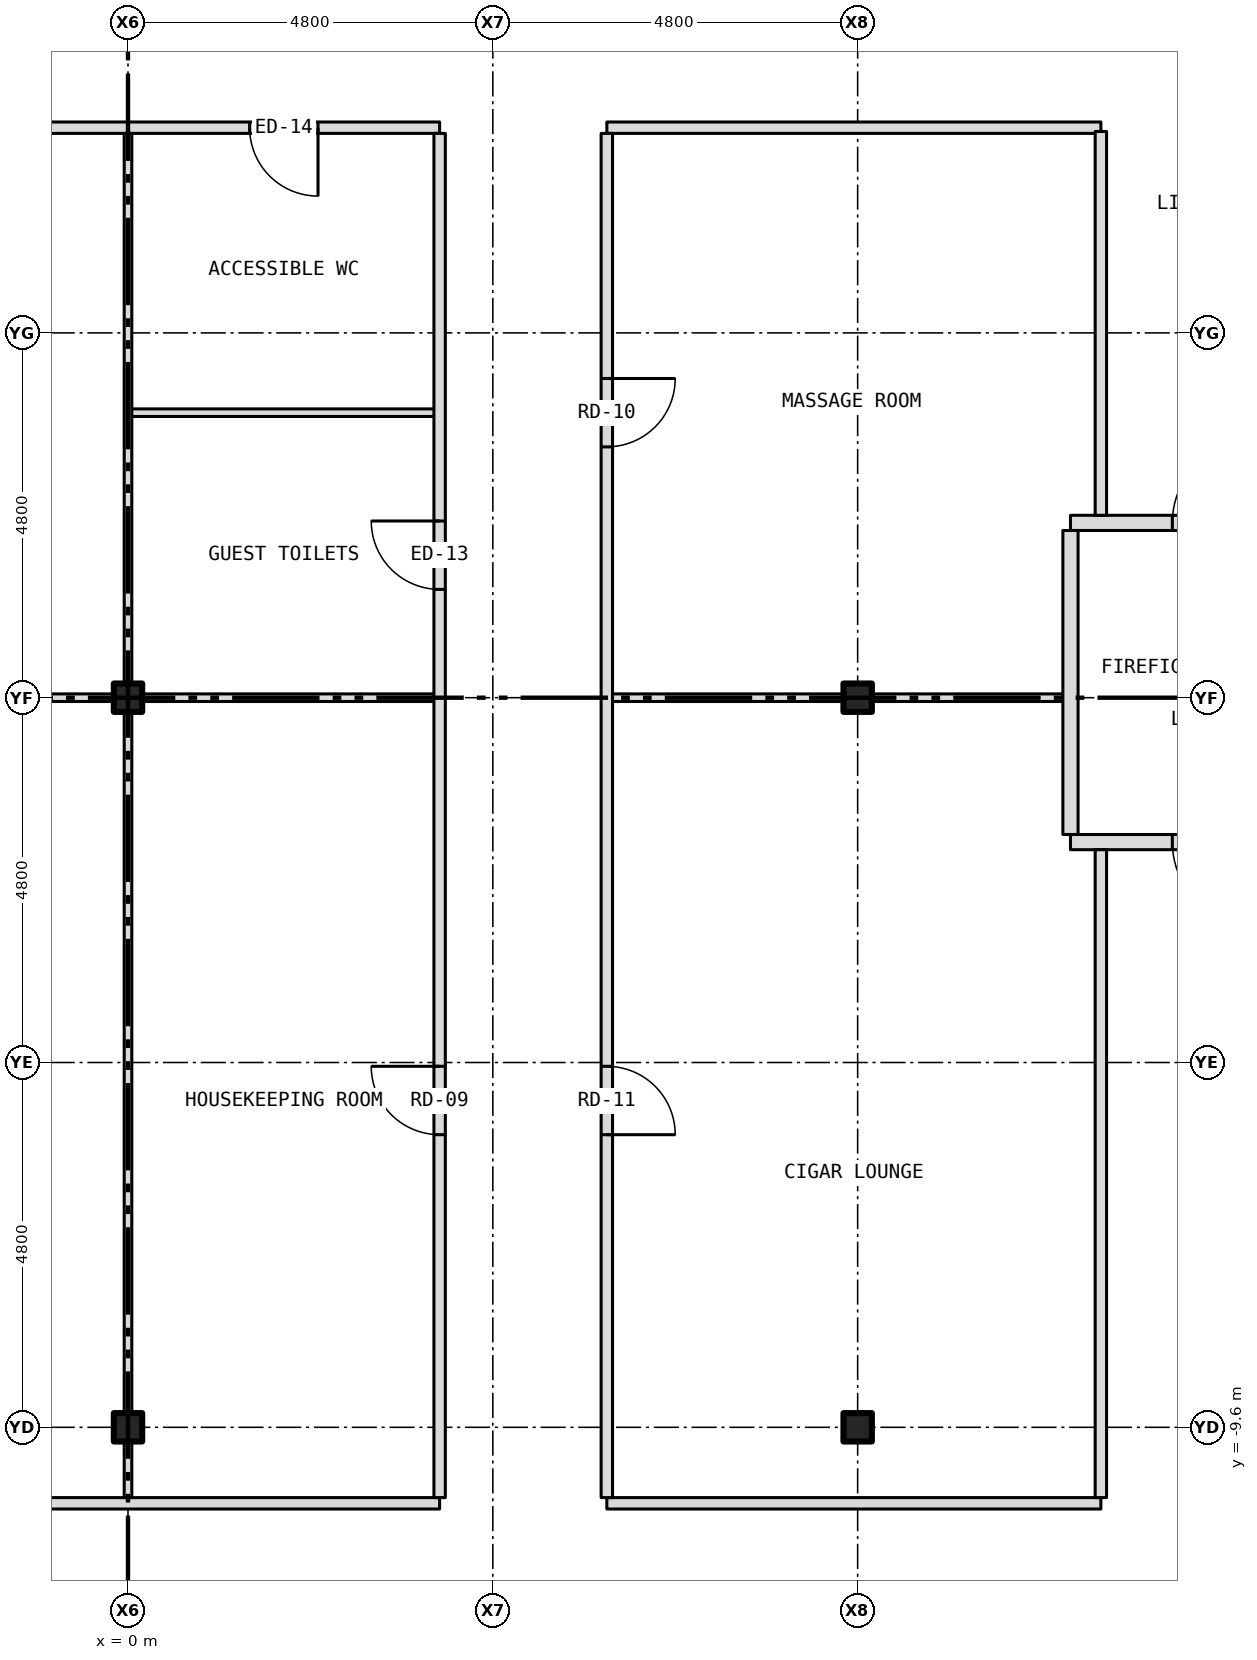
"""IFC4 building model, lengths in metres.
Left out: names, types, materials, properties, quantities, classifications, styles, units other than length and angle.
Written with IfcOpenShell. Run it as: python <this file> out.ifc"""

import sys

from ifc_helpers import new_model, si_unit, direction, frame, frame_2d, origin, origin_2d, place, context, subcontext, project, spatial, rectangle, i_section, extrude, element, fill, save


model = new_model("IFC4")
c1 = context("Model", 3, precision=1e-05, world=origin(), true_north=direction((0.0, 1.0)))
c2 = subcontext(c1, "Body", "Model", "MODEL_VIEW")
j1 = project(units=[si_unit("LENGTHUNIT", "METRE"), si_unit("PLANEANGLEUNIT", "RADIAN")], contexts=[c1])
p1 = place(None, origin())
s1 = spatial("IfcSite", under=j1, at=p1, CompositionType="ELEMENT")
p2 = place(p1, origin())
s2 = spatial("IfcBuilding", under=s1, at=p2, CompositionType="ELEMENT")
p3 = place(p2, frame((0.0, 0.0, 201.5)))
s3 = spatial("IfcBuildingStorey", under=s2, at=p3, CompositionType="ELEMENT", Elevation=201.5)
for number, where, z_axis, x_axis in (
    (1, (0.0, -9.6, -0.15), (0.0, 0.0, 1.0), (1.0, 0.0, 0.0)),
    (2, (0.0, 0.0, -0.15), (0.0, 0.0, 1.0), (1.0, 0.0, 0.0)),
    (3, (9.6, -9.6, -0.15), (0.0, 0.0, 1.0), (1.0, 0.0, 0.0)),
    (4, (9.6, 0.0, -0.15), (0.0, 0.0, 1.0), (1.0, 0.0, 0.0)),
):
    element("IfcColumn", number, at=place(p3, frame(where, z_axis=z_axis, x_axis=x_axis)), inside=s3, PredefinedType="COLUMN", context=c2, shape_type="SweptSolid", body=[
        extrude(i_section(OverallWidth=0.373, OverallDepth=0.373, WebThickness=0.016, FlangeThickness=0.026, at=origin_2d()), origin(), (0.0, 0.0, 1.0), 3.5),
    ])
p4 = place(p3, frame((-12.8, -10.6, 0.0), z_axis=(0.0, 0.0, 1.0), x_axis=(1.0, 0.0, 0.0)))
e5 = element("IfcWall", 5, at=p4, inside=s3, PredefinedType="PARTITIONING", context=c2, shape_type="SweptSolid", body=[
    extrude(rectangle(XDim=16.9, YDim=0.15, at=frame_2d((8.45, 0.0))), origin(), (0.0, 0.0, 1.0), 3.35),
])
p5 = place(p4, frame((5.95, 0.0, 0.0)))
e6 = element("IfcOpeningElement", 6, at=p5, cuts=e5, PredefinedType="OPENING", context=c2, shape_type="SweptSolid", body=[
    extrude(rectangle(XDim=0.9, YDim=2.1, at=frame_2d((0.45, 1.05))), frame((0.0, 0.087, 0.0), z_axis=(0.0, -1.0, 0.0), x_axis=(1.0, 0.0, 0.0)), (0.0, 0.0, 1.0), 0.174),
])
p6 = place(p3, frame((6.3, -10.6, 0.0), z_axis=(0.0, 0.0, 1.0), x_axis=(1.0, 0.0, 0.0)))
e7 = element("IfcWall", 7, at=p6, inside=s3, PredefinedType="PARTITIONING", context=c2, shape_type="SweptSolid", body=[
    extrude(rectangle(XDim=6.5, YDim=0.15, at=frame_2d((3.25, 0.0))), origin(), (0.0, 0.0, 1.0), 3.35),
])
p7 = place(p3, frame((12.4, -1.9, 0.0), z_axis=(0.0, 0.0, 1.0), x_axis=(1.0, 0.0, 0.0)))
e8 = element("IfcWall", 8, at=p7, inside=s3, PredefinedType="PARTITIONING", context=c2, shape_type="SweptSolid", body=[
    extrude(rectangle(XDim=3.28, YDim=0.2, at=frame_2d((1.64, 0.0))), origin(), (0.0, 0.0, 1.0), 3.35),
])
p8 = place(p7, frame((1.34, 0.0, 0.0)))
e9 = element("IfcOpeningElement", 9, at=p8, cuts=e8, PredefinedType="OPENING", context=c2, shape_type="SweptSolid", body=[
    extrude(rectangle(XDim=1.1, YDim=2.1, at=frame_2d((0.55, 1.05))), frame((0.0, 0.112, 0.0), z_axis=(0.0, -1.0, 0.0), x_axis=(1.0, 0.0, 0.0)), (0.0, 0.0, 1.0), 0.224),
])
p9 = place(p3, frame((-9.413, 0.0, 0.0), z_axis=(0.0, 0.0, 1.0), x_axis=(1.0, 0.0, 0.0)))
e10 = element("IfcWall", 10, at=p9, inside=s3, PredefinedType="PARTITIONING", context=c2, shape_type="SweptSolid", body=[
    extrude(rectangle(XDim=9.226, YDim=0.1, at=frame_2d((4.613, 0.0))), origin(), (0.0, 0.0, 1.0), 2.728),
])
p10 = place(p3, frame((-0.187, 0.0, 0.0), z_axis=(0.0, 0.0, 1.0), x_axis=(1.0, 0.0, 0.0)))
e11 = element("IfcWall", 11, at=p10, inside=s3, PredefinedType="PARTITIONING", context=c2, shape_type="SweptSolid", body=[
    extrude(rectangle(XDim=0.374, YDim=0.1, at=frame_2d((0.187, 0.0))), origin(), (0.0, 0.0, 1.0), 3.35),
])
p11 = place(p3, frame((0.187, 0.0, 0.0), z_axis=(0.0, 0.0, 1.0), x_axis=(1.0, 0.0, 0.0)))
e12 = element("IfcWall", 12, at=p11, inside=s3, PredefinedType="PARTITIONING", context=c2, shape_type="SweptSolid", body=[
    extrude(rectangle(XDim=3.913, YDim=0.1, at=frame_2d((1.957, 0.0))), origin(), (0.0, 0.0, 1.0), 2.728),
])
p12 = place(p3, frame((6.3, 0.0, 0.0), z_axis=(0.0, 0.0, 1.0), x_axis=(1.0, 0.0, 0.0)))
e13 = element("IfcWall", 13, at=p12, inside=s3, PredefinedType="PARTITIONING", context=c2, shape_type="SweptSolid", body=[
    extrude(rectangle(XDim=3.113, YDim=0.1, at=frame_2d((1.557, 0.0))), origin(), (0.0, 0.0, 1.0), 2.728),
])
p13 = place(p3, frame((9.413, 0.0, 0.0), z_axis=(0.0, 0.0, 1.0), x_axis=(1.0, 0.0, 0.0)))
e14 = element("IfcWall", 14, at=p13, inside=s3, PredefinedType="PARTITIONING", context=c2, shape_type="SweptSolid", body=[
    extrude(rectangle(XDim=0.374, YDim=0.1, at=frame_2d((0.187, 0.0))), origin(), (0.0, 0.0, 1.0), 3.35),
])
p14 = place(p3, frame((9.787, 0.0, 0.0), z_axis=(0.0, 0.0, 1.0), x_axis=(1.0, 0.0, 0.0)))
e15 = element("IfcWall", 15, at=p14, inside=s3, PredefinedType="PARTITIONING", context=c2, shape_type="SweptSolid", body=[
    extrude(rectangle(XDim=2.613, YDim=0.1, at=frame_2d((1.306, 0.0))), origin(), (0.0, 0.0, 1.0), 2.728),
])
p15 = place(p3, frame((12.4, 2.3, 0.0), z_axis=(0.0, 0.0, 1.0), x_axis=(1.0, 0.0, 0.0)))
e16 = element("IfcWall", 16, at=p15, inside=s3, PredefinedType="PARTITIONING", context=c2, shape_type="SweptSolid", body=[
    extrude(rectangle(XDim=3.28, YDim=0.2, at=frame_2d((1.64, 0.0))), origin(), (0.0, 0.0, 1.0), 3.35),
])
p16 = place(p15, frame((1.34, 0.0, 0.0)))
e17 = element("IfcOpeningElement", 17, at=p16, cuts=e16, PredefinedType="OPENING", context=c2, shape_type="SweptSolid", body=[
    extrude(rectangle(XDim=1.1, YDim=2.1, at=frame_2d((0.55, 1.05))), frame((0.0, 0.112, 0.0), z_axis=(0.0, -1.0, 0.0), x_axis=(1.0, 0.0, 0.0)), (0.0, 0.0, 1.0), 0.224),
])
p17 = place(p3, frame((0.0, 3.75, 0.0), z_axis=(0.0, 0.0, 1.0), x_axis=(1.0, 0.0, 0.0)))
e18 = element("IfcWall", 18, at=p17, inside=s3, PredefinedType="PARTITIONING", context=c2, shape_type="SweptSolid", body=[
    extrude(rectangle(XDim=4.1, YDim=0.1, at=frame_2d((2.05, 0.0))), origin(), (0.0, 0.0, 1.0), 3.35),
])
p18 = place(p3, frame((-12.8, 7.5, 0.0), z_axis=(0.0, 0.0, 1.0), x_axis=(1.0, 0.0, 0.0)))
e19 = element("IfcWall", 19, at=p18, inside=s3, PredefinedType="PARTITIONING", context=c2, shape_type="SweptSolid", body=[
    extrude(rectangle(XDim=16.9, YDim=0.15, at=frame_2d((8.45, 0.0))), origin(), (0.0, 0.0, 1.0), 3.35),
])
p19 = place(p18, frame((14.4, 0.0, 0.0)))
e20 = element("IfcOpeningElement", 20, at=p19, cuts=e19, PredefinedType="OPENING", context=c2, shape_type="SweptSolid", body=[
    extrude(rectangle(XDim=0.9, YDim=2.1, at=frame_2d((0.45, 1.05))), frame((0.0, 0.087, 0.0), z_axis=(0.0, -1.0, 0.0), x_axis=(1.0, 0.0, 0.0)), (0.0, 0.0, 1.0), 0.174),
])
p20 = place(p18, frame((5.95, 0.0, 0.0)))
e21 = element("IfcOpeningElement", 21, at=p20, cuts=e19, PredefinedType="OPENING", context=c2, shape_type="SweptSolid", body=[
    extrude(rectangle(XDim=0.9, YDim=2.1, at=frame_2d((0.45, 1.05))), frame((0.0, 0.087, 0.0), z_axis=(0.0, -1.0, 0.0), x_axis=(1.0, 0.0, 0.0)), (0.0, 0.0, 1.0), 0.174),
])
p21 = place(p3, frame((6.3, 7.5, 0.0), z_axis=(0.0, 0.0, 1.0), x_axis=(1.0, 0.0, 0.0)))
e22 = element("IfcWall", 22, at=p21, inside=s3, PredefinedType="PARTITIONING", context=c2, shape_type="SweptSolid", body=[
    extrude(rectangle(XDim=6.5, YDim=0.15, at=frame_2d((3.25, 0.0))), origin(), (0.0, 0.0, 1.0), 3.35),
])
p22 = place(p3, frame((0.0, -10.525, 0.0), z_axis=(0.0, 0.0, 1.0), x_axis=(0.0, 1.0, 0.0)))
e23 = element("IfcWall", 23, at=p22, inside=s3, PredefinedType="PARTITIONING", context=c2, shape_type="SweptSolid", body=[
    extrude(rectangle(XDim=0.738, YDim=0.1, at=frame_2d((0.369, 0.0))), origin(), (0.0, 0.0, 1.0), 2.728),
])
p23 = place(p3, frame((0.0, -9.787, 0.0), z_axis=(0.0, 0.0, 1.0), x_axis=(0.0, 1.0, 0.0)))
e24 = element("IfcWall", 24, at=p23, inside=s3, PredefinedType="PARTITIONING", context=c2, shape_type="SweptSolid", body=[
    extrude(rectangle(XDim=0.374, YDim=0.1, at=frame_2d((0.187, 0.0))), origin(), (0.0, 0.0, 1.0), 3.35),
])
p24 = place(p3, frame((0.0, -9.413, 0.0), z_axis=(0.0, 0.0, 1.0), x_axis=(0.0, 1.0, 0.0)))
e25 = element("IfcWall", 25, at=p24, inside=s3, PredefinedType="PARTITIONING", context=c2, shape_type="SweptSolid", body=[
    extrude(rectangle(XDim=9.363, YDim=0.1, at=frame_2d((4.682, 0.0))), origin(), (0.0, 0.0, 1.0), 2.728),
])
p25 = place(p3, frame((0.0, 0.05, 0.0), z_axis=(0.0, 0.0, 1.0), x_axis=(0.0, 1.0, 0.0)))
e26 = element("IfcWall", 26, at=p25, inside=s3, PredefinedType="PARTITIONING", context=c2, shape_type="SweptSolid", body=[
    extrude(rectangle(XDim=7.375, YDim=0.1, at=frame_2d((3.688, 0.0))), origin(), (0.0, 0.0, 1.0), 2.728),
])
p26 = place(p3, frame((4.1, -10.525, 0.0), z_axis=(0.0, 0.0, 1.0), x_axis=(0.0, 1.0, 0.0)))
e27 = element("IfcWall", 27, at=p26, inside=s3, PredefinedType="PARTITIONING", context=c2, shape_type="SweptSolid", body=[
    extrude(rectangle(XDim=17.95, YDim=0.15, at=frame_2d((8.975, 0.0))), origin(), (0.0, 0.0, 1.0), 3.35),
])
p27 = place(p26, frame((11.95, 0.0, 0.0)))
e28 = element("IfcOpeningElement", 28, at=p27, cuts=e27, PredefinedType="OPENING", context=c2, shape_type="SweptSolid", body=[
    extrude(rectangle(XDim=0.9, YDim=2.1, at=frame_2d((0.45, 1.05))), frame((0.0, 0.087, 0.0), z_axis=(0.0, -1.0, 0.0), x_axis=(1.0, 0.0, 0.0)), (0.0, 0.0, 1.0), 0.174),
])
p28 = place(p26, frame((4.775, 0.0, 0.0)))
e29 = element("IfcOpeningElement", 29, at=p28, cuts=e27, PredefinedType="OPENING", context=c2, shape_type="SweptSolid", body=[
    extrude(rectangle(XDim=0.9, YDim=2.1, at=frame_2d((0.45, 1.05))), frame((0.0, 0.087, 0.0), z_axis=(0.0, -1.0, 0.0), x_axis=(1.0, 0.0, 0.0)), (0.0, 0.0, 1.0), 0.174),
])
p29 = place(p3, frame((6.3, -10.525, 0.0), z_axis=(0.0, 0.0, 1.0), x_axis=(0.0, 1.0, 0.0)))
e30 = element("IfcWall", 30, at=p29, inside=s3, PredefinedType="PARTITIONING", context=c2, shape_type="SweptSolid", body=[
    extrude(rectangle(XDim=17.95, YDim=0.15, at=frame_2d((8.975, 0.0))), origin(), (0.0, 0.0, 1.0), 3.35),
])
p30 = place(p29, frame((13.825, 0.0, 0.0)))
e31 = element("IfcOpeningElement", 31, at=p30, cuts=e30, PredefinedType="OPENING", context=c2, shape_type="SweptSolid", body=[
    extrude(rectangle(XDim=0.9, YDim=2.1, at=frame_2d((0.45, 1.05))), frame((0.0, 0.087, 0.0), z_axis=(0.0, -1.0, 0.0), x_axis=(1.0, 0.0, 0.0)), (0.0, 0.0, 1.0), 0.174),
])
p31 = place(p29, frame((4.775, 0.0, 0.0)))
e32 = element("IfcOpeningElement", 32, at=p31, cuts=e30, PredefinedType="OPENING", context=c2, shape_type="SweptSolid", body=[
    extrude(rectangle(XDim=0.9, YDim=2.1, at=frame_2d((0.45, 1.05))), frame((0.0, 0.087, 0.0), z_axis=(0.0, -1.0, 0.0), x_axis=(1.0, 0.0, 0.0)), (0.0, 0.0, 1.0), 0.174),
])
p32 = place(p3, frame((12.4, -1.8, 0.0), z_axis=(0.0, 0.0, 1.0), x_axis=(0.0, 1.0, 0.0)))
e33 = element("IfcWall", 33, at=p32, inside=s3, PredefinedType="PARTITIONING", context=c2, shape_type="SweptSolid", body=[
    extrude(rectangle(XDim=4.0, YDim=0.2, at=frame_2d((2.0, 0.0))), origin(), (0.0, 0.0, 1.0), 3.35),
])
p33 = place(p3, frame((12.8, -10.525, 0.0), z_axis=(0.0, 0.0, 1.0), x_axis=(0.0, 1.0, 0.0)))
e34 = element("IfcWall", 34, at=p33, inside=s3, PredefinedType="PARTITIONING", context=c2, shape_type="SweptSolid", body=[
    extrude(rectangle(XDim=8.525, YDim=0.15, at=frame_2d((4.262, 0.0))), origin(), (0.0, 0.0, 1.0), 3.35),
])
p34 = place(p3, frame((12.8, 2.4, 0.0), z_axis=(0.0, 0.0, 1.0), x_axis=(0.0, 1.0, 0.0)))
e35 = element("IfcWall", 35, at=p34, inside=s3, PredefinedType="PARTITIONING", context=c2, shape_type="SweptSolid", body=[
    extrude(rectangle(XDim=5.05, YDim=0.15, at=frame_2d((2.525, 0.0))), origin(), (0.0, 0.0, 1.0), 3.35),
])
p35 = place(p16, origin())
e36 = element("IfcDoor", 36, at=p35, inside=s3, OperationType="SINGLE_SWING_RIGHT", PredefinedType="DOOR", context=c2, shape_type="SweptSolid", body=[
    extrude(rectangle(XDim=1.1, YDim=2.1, at=frame_2d((0.55, 1.05))), frame((0.0, 0.025, 0.0), z_axis=(0.0, -1.0, 0.0), x_axis=(1.0, 0.0, 0.0)), (0.0, 0.0, 1.0), 0.05),
])
fill(e17, e36)
p36 = place(p8, origin())
e37 = element("IfcDoor", 37, at=p36, inside=s3, OperationType="SINGLE_SWING_RIGHT", PredefinedType="DOOR", context=c2, shape_type="SweptSolid", body=[
    extrude(rectangle(XDim=1.1, YDim=2.1, at=frame_2d((0.55, 1.05))), frame((0.0, 0.025, 0.0), z_axis=(0.0, -1.0, 0.0), x_axis=(1.0, 0.0, 0.0)), (0.0, 0.0, 1.0), 0.05),
])
fill(e9, e37)
p37 = place(p27, origin())
e38 = element("IfcDoor", 38, at=p37, inside=s3, OperationType="SINGLE_SWING_RIGHT", PredefinedType="DOOR", context=c2, shape_type="SweptSolid", body=[
    extrude(rectangle(XDim=0.9, YDim=2.1, at=frame_2d((0.45, 1.05))), frame((0.0, 0.025, 0.0), z_axis=(0.0, -1.0, 0.0), x_axis=(1.0, 0.0, 0.0)), (0.0, 0.0, 1.0), 0.05),
])
fill(e28, e38)
p38 = place(p19, origin())
e39 = element("IfcDoor", 39, at=p38, inside=s3, OperationType="SINGLE_SWING_RIGHT", PredefinedType="DOOR", context=c2, shape_type="SweptSolid", body=[
    extrude(rectangle(XDim=0.9, YDim=2.1, at=frame_2d((0.45, 1.05))), frame((0.0, 0.025, 0.0), z_axis=(0.0, -1.0, 0.0), x_axis=(1.0, 0.0, 0.0)), (0.0, 0.0, 1.0), 0.05),
])
fill(e20, e39)
p39 = place(p28, origin())
e40 = element("IfcDoor", 40, at=p39, inside=s3, OperationType="SINGLE_SWING_RIGHT", PredefinedType="DOOR", context=c2, shape_type="SweptSolid", body=[
    extrude(rectangle(XDim=0.9, YDim=2.1, at=frame_2d((0.45, 1.05))), frame((0.0, 0.025, 0.0), z_axis=(0.0, -1.0, 0.0), x_axis=(1.0, 0.0, 0.0)), (0.0, 0.0, 1.0), 0.05),
])
fill(e29, e40)
p40 = place(p30, origin())
e41 = element("IfcDoor", 41, at=p40, inside=s3, OperationType="SINGLE_SWING_RIGHT", PredefinedType="DOOR", context=c2, shape_type="SweptSolid", body=[
    extrude(rectangle(XDim=0.9, YDim=2.1, at=frame_2d((0.45, 1.05))), frame((0.0, 0.025, 0.0), z_axis=(0.0, -1.0, 0.0), x_axis=(1.0, 0.0, 0.0)), (0.0, 0.0, 1.0), 0.05),
])
fill(e31, e41)
p41 = place(p31, origin())
e42 = element("IfcDoor", 42, at=p41, inside=s3, OperationType="SINGLE_SWING_LEFT", PredefinedType="DOOR", context=c2, shape_type="SweptSolid", body=[
    extrude(rectangle(XDim=0.9, YDim=2.1, at=frame_2d((0.45, 1.05))), frame((0.0, 0.025, 0.0), z_axis=(0.0, -1.0, 0.0), x_axis=(1.0, 0.0, 0.0)), (0.0, 0.0, 1.0), 0.05),
])
fill(e32, e42)
save(model, sys.argv[1])
